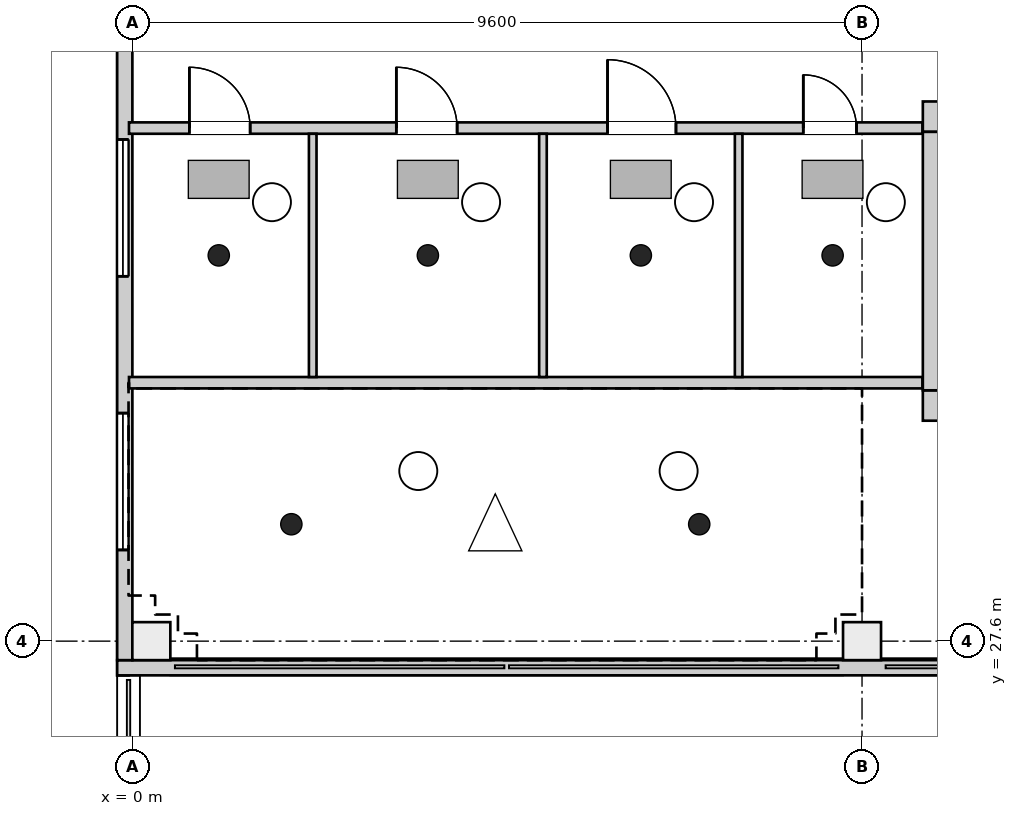
"""IFC4 building model, lengths in metres.
Left out: names, types, materials, properties, quantities, classifications, styles, units other than length and angle.
Written with IfcOpenShell. Run it as: python <this file> out.ifc"""

import sys

from ifc_helpers import new_model, si_unit, direction, frame, frame_2d, origin, origin_2d, place, context, subcontext, project, spatial, rectangle, extrude, element, fill, save


model = new_model("IFC4")
c1 = context("Model", 3, precision=1e-05, world=origin(), true_north=direction((0.0, 1.0)))
c2 = subcontext(c1, "Body", "Model", "MODEL_VIEW")
j1 = project(units=[si_unit("LENGTHUNIT", "METRE"), si_unit("PLANEANGLEUNIT", "RADIAN")], contexts=[c1])
p1 = place(None, origin())
s1 = spatial("IfcSite", under=j1, at=p1, CompositionType="ELEMENT")
p2 = place(p1, origin())
s2 = spatial("IfcBuilding", under=s1, at=p2, CompositionType="ELEMENT")
p3 = place(p2, frame((0.0, 0.0, 78.1)))
s3 = spatial("IfcBuildingStorey", under=s2, at=p3, CompositionType="ELEMENT", Elevation=78.1)
p4 = place(p3, frame((10.4, 30.7, 0.0), z_axis=(0.0, 0.0, 1.0), x_axis=(1.0, 0.0, 0.0)))
e1 = element("IfcWall", 1, at=p4, inside=s3, PredefinedType="SHEAR", context=c2, shape_type="SweptSolid", body=[
    extrude(rectangle(XDim=3.1, YDim=0.4, at=frame_2d((1.55, 0.0))), origin(), (0.0, 0.0, 1.0), 7.6),
])
p5 = place(p4, frame((0.95, 0.0, 0.0)))
e2 = element("IfcOpeningElement", 2, at=p5, cuts=e1, PredefinedType="OPENING", context=c2, shape_type="SweptSolid", body=[
    extrude(rectangle(XDim=1.2, YDim=2.1, at=frame_2d((0.6, 1.05))), frame((0.0, 0.21, 0.0), z_axis=(0.0, -1.0, 0.0), x_axis=(1.0, 0.0, 0.0)), (0.0, 0.0, 1.0), 0.42),
])
p6 = place(p3, frame((10.4, 34.5, 0.0), z_axis=(0.0, 0.0, 1.0), x_axis=(1.0, 0.0, 0.0)))
e3 = element("IfcWall", 3, at=p6, inside=s3, PredefinedType="SHEAR", context=c2, shape_type="SweptSolid", body=[
    extrude(rectangle(XDim=3.1, YDim=0.4, at=frame_2d((1.55, 0.0))), origin(), (0.0, 0.0, 1.0), 7.6),
])
p7 = place(p3, frame((10.6, 30.9, 0.0), z_axis=(0.0, 0.0, 1.0), x_axis=(0.0, 1.0, 0.0)))
e4 = element("IfcWall", 4, at=p7, inside=s3, PredefinedType="SHEAR", context=c2, shape_type="SweptSolid", body=[
    extrude(rectangle(XDim=3.4, YDim=0.4, at=frame_2d((1.7, 0.0))), origin(), (0.0, 0.0, 1.0), 7.6),
])
for number, where, z_axis, x_axis in (
    (5, (0.25, 27.6, 0.0), (0.0, 0.0, 1.0), (1.0, 0.0, 0.0)),
    (6, (9.6, 27.6, 0.0), (0.0, 0.0, 1.0), (1.0, 0.0, 0.0)),
):
    element("IfcColumn", number, at=place(p3, frame(where, z_axis=z_axis, x_axis=x_axis)), inside=s3, PredefinedType="COLUMN", context=c2, shape_type="SweptSolid", body=[
        extrude(rectangle(XDim=0.5, YDim=0.5, at=origin_2d()), origin(), (0.0, 0.0, 1.0), 3.9),
    ])
p8 = place(p3, frame((-0.125, 46.45, 0.0), z_axis=(0.0, 0.0, 1.0), x_axis=(0.0, -1.0, 0.0)))
e7 = element("IfcWall", 7, at=p8, inside=s3, PredefinedType="ELEMENTEDWALL", context=c2, shape_type="SweptSolid", body=[
    extrude(rectangle(XDim=19.3, YDim=0.15, at=frame_2d((9.65, 0.0))), origin(), (0.0, 0.0, 1.0), 3.9),
])
p9 = place(p8, frame((15.85, 0.0, 0.9)))
e8 = element("IfcOpeningElement", 8, at=p9, cuts=e7, PredefinedType="OPENING", context=c2, shape_type="SweptSolid", body=[
    extrude(rectangle(XDim=1.8, YDim=2.6, at=frame_2d((0.9, 1.3))), frame((0.0, 0.085, 0.0), z_axis=(0.0, -1.0, 0.0), x_axis=(1.0, 0.0, 0.0)), (0.0, 0.0, 1.0), 0.17),
])
p10 = place(p8, frame((12.25, 0.0, 0.9)))
e9 = element("IfcOpeningElement", 9, at=p10, cuts=e7, PredefinedType="OPENING", context=c2, shape_type="SweptSolid", body=[
    extrude(rectangle(XDim=1.8, YDim=2.6, at=frame_2d((0.9, 1.3))), frame((0.0, 0.085, 0.0), z_axis=(0.0, -1.0, 0.0), x_axis=(1.0, 0.0, 0.0)), (0.0, 0.0, 1.0), 0.17),
])
p11 = place(p8, frame((8.65, 0.0, 0.9)))
e10 = element("IfcOpeningElement", 10, at=p11, cuts=e7, PredefinedType="OPENING", context=c2, shape_type="SweptSolid", body=[
    extrude(rectangle(XDim=1.8, YDim=2.6, at=frame_2d((0.9, 1.3))), frame((0.0, 0.085, 0.0), z_axis=(0.0, -1.0, 0.0), x_axis=(1.0, 0.0, 0.0)), (0.0, 0.0, 1.0), 0.17),
])
p12 = place(p8, frame((5.05, 0.0, 0.9)))
e11 = element("IfcOpeningElement", 11, at=p12, cuts=e7, PredefinedType="OPENING", context=c2, shape_type="SweptSolid", body=[
    extrude(rectangle(XDim=1.8, YDim=2.6, at=frame_2d((0.9, 1.3))), frame((0.0, 0.085, 0.0), z_axis=(0.0, -1.0, 0.0), x_axis=(1.0, 0.0, 0.0)), (0.0, 0.0, 1.0), 0.17),
])
p13 = place(p8, frame((1.45, 0.0, 0.9)))
e12 = element("IfcOpeningElement", 12, at=p13, cuts=e7, PredefinedType="OPENING", context=c2, shape_type="SweptSolid", body=[
    extrude(rectangle(XDim=1.8, YDim=2.6, at=frame_2d((0.9, 1.3))), frame((0.0, 0.085, 0.0), z_axis=(0.0, -1.0, 0.0), x_axis=(1.0, 0.0, 0.0)), (0.0, 0.0, 1.0), 0.17),
])
p14 = place(p3, frame((-0.199, 27.25, 4.2), z_axis=(0.0, 0.0, 1.0), x_axis=(1.0, 0.0, 0.0)))
e13 = element("IfcWall", 13, at=p14, inside=s3, PredefinedType="PARAPET", context=c2, shape_type="SweptSolid", body=[
    extrude(rectangle(XDim=39.05, YDim=0.2, at=frame_2d((19.525, 0.0))), origin(), (0.0, 0.0, 1.0), 1.1),
])
p15 = place(p3, frame((-0.099, 46.25, 4.2), z_axis=(0.0, 0.0, 1.0), x_axis=(0.0, -1.0, 0.0)))
e14 = element("IfcWall", 14, at=p15, inside=s3, PredefinedType="PARAPET", context=c2, shape_type="SweptSolid", body=[
    extrude(rectangle(XDim=18.9, YDim=0.2, at=frame_2d((9.45, 0.0))), origin(), (0.0, 0.0, 1.0), 1.1),
])
p16 = place(p3, frame((-0.044, 31.0, 0.0), z_axis=(0.0, 0.0, 1.0), x_axis=(1.0, 0.0, 0.0)))
e15 = element("IfcWall", 15, at=p16, inside=s3, PredefinedType="PARTITIONING", context=c2, shape_type="SweptSolid", body=[
    extrude(rectangle(XDim=10.438, YDim=0.15, at=frame_2d((5.219, 0.0))), origin(), (0.0, 0.0, 1.0), 3.9),
])
p17 = place(p3, frame((-0.044, 34.35, 0.0), z_axis=(0.0, 0.0, 1.0), x_axis=(1.0, 0.0, 0.0)))
e16 = element("IfcWall", 16, at=p17, inside=s3, PredefinedType="PARTITIONING", context=c2, shape_type="SweptSolid", body=[
    extrude(rectangle(XDim=10.438, YDim=0.15, at=frame_2d((5.219, 0.0))), origin(), (0.0, 0.0, 1.0), 3.9),
])
p18 = place(p17, frame((0.794, 0.0, 0.0)))
e17 = element("IfcOpeningElement", 17, at=p18, cuts=e16, PredefinedType="OPENING", context=c2, shape_type="SweptSolid", body=[
    extrude(rectangle(XDim=0.8, YDim=2.1, at=frame_2d((0.4, 1.05))), frame((0.0, 0.085, 0.0), z_axis=(0.0, -1.0, 0.0), x_axis=(1.0, 0.0, 0.0)), (0.0, 0.0, 1.0), 0.17),
])
p19 = place(p17, frame((3.517, 0.0, 0.0)))
e18 = element("IfcOpeningElement", 18, at=p19, cuts=e16, PredefinedType="OPENING", context=c2, shape_type="SweptSolid", body=[
    extrude(rectangle(XDim=0.8, YDim=2.1, at=frame_2d((0.4, 1.05))), frame((0.0, 0.085, 0.0), z_axis=(0.0, -1.0, 0.0), x_axis=(1.0, 0.0, 0.0)), (0.0, 0.0, 1.0), 0.17),
])
p20 = place(p17, frame((6.296, 0.0, 0.0)))
e19 = element("IfcOpeningElement", 19, at=p20, cuts=e16, PredefinedType="OPENING", context=c2, shape_type="SweptSolid", body=[
    extrude(rectangle(XDim=0.9, YDim=2.1, at=frame_2d((0.45, 1.05))), frame((0.0, 0.085, 0.0), z_axis=(0.0, -1.0, 0.0), x_axis=(1.0, 0.0, 0.0)), (0.0, 0.0, 1.0), 0.17),
])
p21 = place(p17, frame((8.871, 0.0, 0.0)))
e20 = element("IfcOpeningElement", 20, at=p21, cuts=e16, PredefinedType="OPENING", context=c2, shape_type="SweptSolid", body=[
    extrude(rectangle(XDim=0.7, YDim=2.1, at=frame_2d((0.35, 1.05))), frame((0.0, 0.085, 0.0), z_axis=(0.0, -1.0, 0.0), x_axis=(1.0, 0.0, 0.0)), (0.0, 0.0, 1.0), 0.17),
])
for number, where, z_axis, x_axis in (
    (21, (2.373, 31.075, 0.0), (0.0, 0.0, 1.0), (0.0, 1.0, 0.0)),
    (22, (5.402, 31.075, 0.0), (0.0, 0.0, 1.0), (0.0, 1.0, 0.0)),
    (23, (7.977, 31.075, 0.0), (0.0, 0.0, 1.0), (0.0, 1.0, 0.0)),
):
    element("IfcWall", number, at=place(p3, frame(where, z_axis=z_axis, x_axis=x_axis)), inside=s3, PredefinedType="PARTITIONING", context=c2, shape_type="SweptSolid", body=[
        extrude(rectangle(XDim=3.2, YDim=0.1, at=frame_2d((1.6, 0.0))), origin(), (0.0, 0.0, 1.0), 3.9),
    ])
p22 = place(p9, origin())
e24 = element("IfcWindow", 24, at=p22, inside=s3, PartitioningType="SINGLE_PANEL", PredefinedType="WINDOW", context=c2, shape_type="SweptSolid", body=[
    extrude(rectangle(XDim=1.8, YDim=2.6, at=frame_2d((0.9, 1.3))), frame((0.0, 0.03, 0.0), z_axis=(0.0, -1.0, 0.0), x_axis=(1.0, 0.0, 0.0)), (0.0, 0.0, 1.0), 0.06),
])
fill(e8, e24)
p23 = place(p10, origin())
e25 = element("IfcWindow", 25, at=p23, inside=s3, PartitioningType="SINGLE_PANEL", PredefinedType="WINDOW", context=c2, shape_type="SweptSolid", body=[
    extrude(rectangle(XDim=1.8, YDim=2.6, at=frame_2d((0.9, 1.3))), frame((0.0, 0.03, 0.0), z_axis=(0.0, -1.0, 0.0), x_axis=(1.0, 0.0, 0.0)), (0.0, 0.0, 1.0), 0.06),
])
fill(e9, e25)
p24 = place(p2, frame((0.0, 0.0, 82.3)))
p25 = place(p24, frame((0.0, 0.0, -0.3)))
p26 = place(p25, frame((2.1, 29.95, 0.0)))
p27 = place(p26, frame((0.0, 0.0, 0.25)))
e26 = element("IfcWindow", 26, at=p27, inside=s3, PartitioningType="SINGLE_PANEL", PredefinedType="SKYLIGHT", context=c2, shape_type="SweptSolid", body=[
    extrude(rectangle(XDim=1.8, YDim=3.0, at=origin_2d()), origin(), (0.0, 0.0, 1.0), 0.05),
])
p28 = place(p25, frame((7.6, 29.95, 0.0)))
p29 = place(p28, frame((0.0, 0.0, 0.25)))
e27 = element("IfcWindow", 27, at=p29, inside=s3, PartitioningType="SINGLE_PANEL", PredefinedType="SKYLIGHT", context=c2, shape_type="SweptSolid", body=[
    extrude(rectangle(XDim=1.8, YDim=3.0, at=origin_2d()), origin(), (0.0, 0.0, 1.0), 0.05),
])
p30 = place(p25, frame((4.3, 29.65, 0.0)))
p31 = place(p30, frame((0.0, 0.0, 0.25)))
e28 = element("IfcDoor", 28, at=p31, inside=s3, OperationType="SWING_FIXED_LEFT", PredefinedType="TRAPDOOR", context=c2, shape_type="SweptSolid", body=[
    extrude(rectangle(XDim=1.0, YDim=1.0, at=origin_2d()), origin(), (0.0, 0.0, 1.0), 0.05),
])
p32 = place(p18, origin())
e29 = element("IfcDoor", 29, at=p32, inside=s3, OperationType="SINGLE_SWING_RIGHT", PredefinedType="DOOR", context=c2, shape_type="SweptSolid", body=[
    extrude(rectangle(XDim=0.8, YDim=2.1, at=frame_2d((0.4, 1.05))), frame((0.0, 0.025, 0.0), z_axis=(0.0, -1.0, 0.0), x_axis=(1.0, 0.0, 0.0)), (0.0, 0.0, 1.0), 0.05),
])
fill(e17, e29)
p33 = place(p19, origin())
e30 = element("IfcDoor", 30, at=p33, inside=s3, OperationType="SINGLE_SWING_LEFT", PredefinedType="DOOR", context=c2, shape_type="SweptSolid", body=[
    extrude(rectangle(XDim=0.8, YDim=2.1, at=frame_2d((0.4, 1.05))), frame((0.0, 0.025, 0.0), z_axis=(0.0, -1.0, 0.0), x_axis=(1.0, 0.0, 0.0)), (0.0, 0.0, 1.0), 0.05),
])
fill(e18, e30)
p34 = place(p20, origin())
e31 = element("IfcDoor", 31, at=p34, inside=s3, OperationType="SINGLE_SWING_RIGHT", PredefinedType="DOOR", context=c2, shape_type="SweptSolid", body=[
    extrude(rectangle(XDim=0.9, YDim=2.1, at=frame_2d((0.45, 1.05))), frame((0.0, 0.025, 0.0), z_axis=(0.0, -1.0, 0.0), x_axis=(1.0, 0.0, 0.0)), (0.0, 0.0, 1.0), 0.05),
])
fill(e19, e31)
p35 = place(p21, origin())
e32 = element("IfcDoor", 32, at=p35, inside=s3, OperationType="SINGLE_SWING_LEFT", PredefinedType="DOOR", context=c2, shape_type="SweptSolid", body=[
    extrude(rectangle(XDim=0.7, YDim=2.1, at=frame_2d((0.35, 1.05))), frame((0.0, 0.025, 0.0), z_axis=(0.0, -1.0, 0.0), x_axis=(1.0, 0.0, 0.0)), (0.0, 0.0, 1.0), 0.05),
])
fill(e20, e32)
save(model, sys.argv[1])
